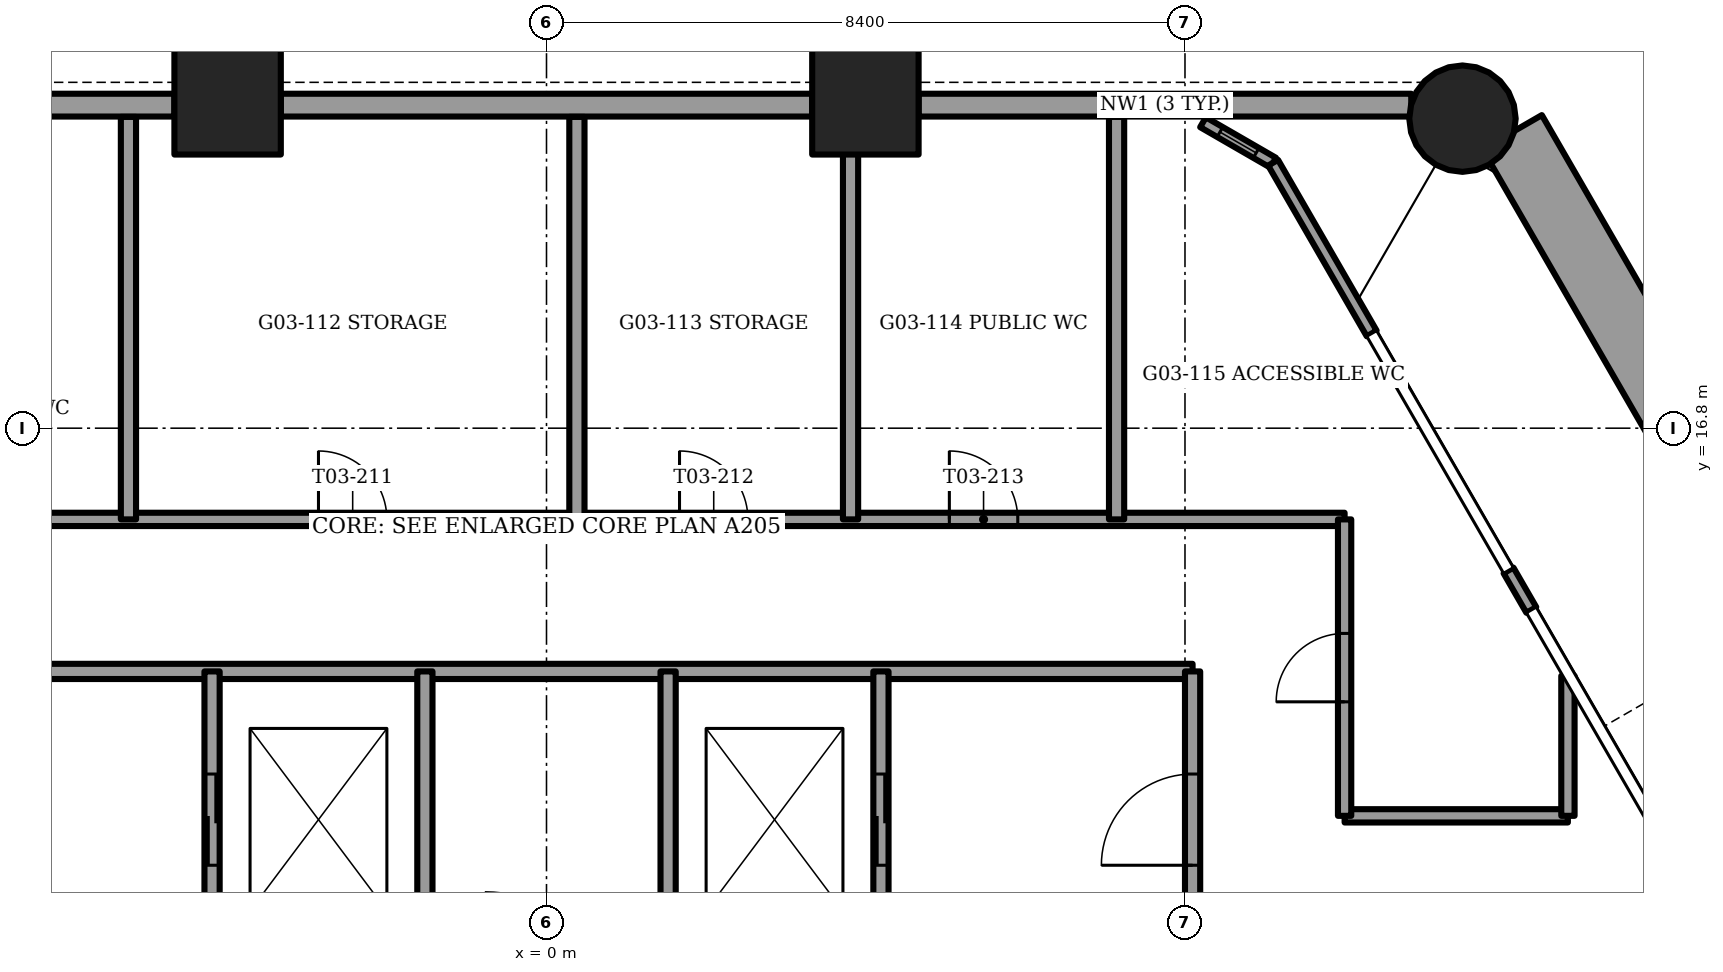
"""IFC4 building model, lengths in metres.
Left out: names, types, materials, properties, quantities, classifications, styles, units other than length and angle.
Written with IfcOpenShell. Run it as: python <this file> out.ifc"""

import sys

from ifc_helpers import new_model, si_unit, direction, frame, frame_2d, origin, origin_2d, place, context, subcontext, project, spatial, rectangle, circle, extrude, element, fill, save


model = new_model("IFC4")
c1 = context("Model", 3, precision=1e-05, world=origin(), true_north=direction((0.0, 1.0)))
c2 = subcontext(c1, "Body", "Model", "MODEL_VIEW")
j1 = project(units=[si_unit("LENGTHUNIT", "METRE"), si_unit("PLANEANGLEUNIT", "RADIAN")], contexts=[c1])
p1 = place(None, origin())
s1 = spatial("IfcSite", under=j1, at=p1, CompositionType="ELEMENT")
p2 = place(p1, origin())
s2 = spatial("IfcBuilding", under=s1, at=p2, CompositionType="ELEMENT")
p3 = place(p2, frame((0.0, 0.0, 14.5)))
s3 = spatial("IfcBuildingStorey", under=s2, at=p3, CompositionType="ELEMENT", Elevation=14.5)
p4 = place(p3, frame((12.051, 20.872, -1.2), z_axis=(0.0, 0.0, 1.0), x_axis=(1.0, 0.0, 0.0)))
e1 = element("IfcColumn", 1, at=p4, inside=s3, PredefinedType="COLUMN", context=c2, shape_type="SweptSolid", body=[
    extrude(circle(Radius=0.7, at=origin_2d()), origin(), (0.0, 0.0, 1.0), 4.5),
])
for number, where, z_axis, x_axis in (
    (2, (4.195, 21.1, -1.2), (0.0, 0.0, 1.0), (1.0, 0.0, 0.0)),
    (3, (-4.195, 21.1, -1.2), (0.0, 0.0, 1.0), (1.0, 0.0, 0.0)),
):
    element("IfcColumn", number, at=place(p3, frame(where, z_axis=z_axis, x_axis=x_axis)), inside=s3, PredefinedType="COLUMN", context=c2, shape_type="SweptSolid", body=[
        extrude(rectangle(XDim=1.4, YDim=1.4, at=origin_2d()), origin(), (0.0, 0.0, 1.0), 4.5),
    ])
p5 = place(p3, frame((16.057, 14.889, 0.0), z_axis=(0.0, 0.0, 1.0), x_axis=(-0.500005133765, 0.866022439784, 0.0)))
e4 = element("IfcWall", 4, at=p5, inside=s3, PredefinedType="PARAPET", context=c2, shape_type="SweptSolid", body=[
    extrude(rectangle(XDim=6.704, YDim=0.9, at=frame_2d((3.352, 0.0))), origin(), (0.0, 0.0, 1.0), 1.1),
])
p6 = place(p3, frame((11.377, 21.05, 0.0), z_axis=(0.0, 0.0, 1.0), x_axis=(-1.0, 0.0, 0.0)))
e5 = element("IfcWall", 5, at=p6, inside=s3, PredefinedType="SOLIDWALL", context=c2, shape_type="SweptSolid", body=[
    extrude(rectangle(XDim=6.481, YDim=0.3, at=frame_2d((3.241, 0.0))), origin(), (0.0, 0.0, 1.0), 3.3),
])
p7 = place(p3, frame((3.495, 21.05, 0.0), z_axis=(0.0, 0.0, 1.0), x_axis=(-1.0, 0.0, 0.0)))
e6 = element("IfcWall", 6, at=p7, inside=s3, PredefinedType="SOLIDWALL", context=c2, shape_type="SweptSolid", body=[
    extrude(rectangle(XDim=6.991, YDim=0.3, at=frame_2d((3.495, 0.0))), origin(), (0.0, 0.0, 1.0), 3.3),
])
p8 = place(p3, frame((-4.896, 21.05, 0.0), z_axis=(0.0, 0.0, 1.0), x_axis=(-1.0, 0.0, 0.0)))
e7 = element("IfcWall", 7, at=p8, inside=s3, PredefinedType="SOLIDWALL", context=c2, shape_type="SweptSolid", body=[
    extrude(rectangle(XDim=6.481, YDim=0.3, at=frame_2d((3.241, 0.0))), origin(), (0.0, 0.0, 1.0), 3.3),
])
p9 = place(p3, frame((10.856, 18.046, 0.0), z_axis=(0.0, 0.0, 1.0), x_axis=(-0.499945140294, 0.866057074734, 0.0)))
e8 = element("IfcWall", 8, at=p9, inside=s3, PredefinedType="SOLIDWALL", context=c2, shape_type="SweptSolid", body=[
    extrude(rectangle(XDim=2.594, YDim=0.15, at=frame_2d((1.297, 0.0))), origin(), (0.0, 0.0, 1.0), 4.2),
])
p10 = place(p3, frame((12.957, 14.409, 0.0), z_axis=(0.0, 0.0, 1.0), x_axis=(-0.50012165622, 0.865955154139, 0.0)))
e9 = element("IfcWall", 9, at=p10, inside=s3, PredefinedType="SOLIDWALL", context=c2, shape_type="SweptSolid", body=[
    extrude(rectangle(XDim=0.6, YDim=0.15, at=frame_2d((0.3, 0.0))), origin(), (0.0, 0.0, 1.0), 4.2),
])
p11 = place(p3, frame((9.56, 20.292, 0.0), z_axis=(0.0, 0.0, 1.0), x_axis=(-0.866048165231, 0.499960573946, 0.0)))
e10 = element("IfcWall", 10, at=p11, inside=s3, PredefinedType="SOLIDWALL", context=c2, shape_type="SweptSolid", body=[
    extrude(rectangle(XDim=1.065, YDim=0.15, at=frame_2d((0.532, 0.0))), origin(), (0.0, 0.0, 1.0), 4.2),
])
p12 = place(p11, frame((0.258, 0.0, 0.15)))
e11 = element("IfcOpeningElement", 11, at=p12, cuts=e10, PredefinedType="OPENING", context=c2, shape_type="SweptSolid", body=[
    extrude(rectangle(XDim=0.55, YDim=3.6, at=frame_2d((0.275, 1.8))), frame((0.0, 0.075, 0.0), z_axis=(0.0, -1.0, 0.0), x_axis=(1.0, 0.0, 0.0)), (0.0, 0.0, 1.0), 0.15),
])
p13 = place(p3, frame((-8.5, 13.6, 0.0), z_axis=(0.0, 0.0, 1.0), x_axis=(1.0, 0.0, 0.0)))
e12 = element("IfcWall", 12, at=p13, inside=s3, PredefinedType="PARTITIONING", context=c2, shape_type="SweptSolid", body=[
    extrude(rectangle(XDim=17.0, YDim=0.2, at=frame_2d((8.5, 0.0))), origin(), (0.0, 0.0, 1.0), 4.2),
])
p14 = place(p3, frame((8.5, 9.7, 0.0), z_axis=(0.0, 0.0, 1.0), x_axis=(0.0, 1.0, 0.0)))
e13 = element("IfcWall", 13, at=p14, inside=s3, PredefinedType="PARTITIONING", context=c2, shape_type="SweptSolid", body=[
    extrude(rectangle(XDim=3.9, YDim=0.2, at=frame_2d((1.95, 0.0))), origin(), (0.0, 0.0, 1.0), 4.2),
])
p15 = place(p14, frame((1.35, 0.0, 0.0)))
e14 = element("IfcOpeningElement", 14, at=p15, cuts=e13, PredefinedType="OPENING", context=c2, shape_type="SweptSolid", body=[
    extrude(rectangle(XDim=1.2, YDim=2.1, at=frame_2d((0.6, 1.05))), frame((0.0, 0.1, 0.0), z_axis=(0.0, -1.0, 0.0), x_axis=(1.0, 0.0, 0.0)), (0.0, 0.0, 1.0), 0.2),
])
p16 = place(p3, frame((-4.4, 9.7, 0.0), z_axis=(0.0, 0.0, 1.0), x_axis=(0.0, 1.0, 0.0)))
e15 = element("IfcWall", 15, at=p16, inside=s3, PredefinedType="PARTITIONING", context=c2, shape_type="SweptSolid", body=[
    extrude(rectangle(XDim=3.9, YDim=0.2, at=frame_2d((1.95, 0.0))), origin(), (0.0, 0.0, 1.0), 4.2),
])
p17 = place(p16, frame((1.35, 0.0, 0.0)))
e16 = element("IfcOpeningElement", 16, at=p17, cuts=e15, PredefinedType="OPENING", context=c2, shape_type="SweptSolid", body=[
    extrude(rectangle(XDim=1.2, YDim=2.1, at=frame_2d((0.6, 1.05))), frame((0.0, 0.1, 0.0), z_axis=(0.0, -1.0, 0.0), x_axis=(1.0, 0.0, 0.0)), (0.0, 0.0, 1.0), 0.2),
])
p18 = place(p3, frame((4.4, 9.7, 0.0), z_axis=(0.0, 0.0, 1.0), x_axis=(0.0, 1.0, 0.0)))
e17 = element("IfcWall", 17, at=p18, inside=s3, PredefinedType="PARTITIONING", context=c2, shape_type="SweptSolid", body=[
    extrude(rectangle(XDim=3.9, YDim=0.2, at=frame_2d((1.95, 0.0))), origin(), (0.0, 0.0, 1.0), 4.2),
])
p19 = place(p18, frame((1.35, 0.0, 0.0)))
e18 = element("IfcOpeningElement", 18, at=p19, cuts=e17, PredefinedType="OPENING", context=c2, shape_type="SweptSolid", body=[
    extrude(rectangle(XDim=1.2, YDim=2.1, at=frame_2d((0.6, 1.05))), frame((0.0, 0.1, 0.0), z_axis=(0.0, -1.0, 0.0), x_axis=(1.0, 0.0, 0.0)), (0.0, 0.0, 1.0), 0.2),
])
for number, where, z_axis, x_axis in (
    (19, (-1.6, 9.7, 0.0), (0.0, 0.0, 1.0), (0.0, 1.0, 0.0)),
    (20, (1.6, 9.7, 0.0), (0.0, 0.0, 1.0), (0.0, 1.0, 0.0)),
):
    element("IfcWall", number, at=place(p3, frame(where, z_axis=z_axis, x_axis=x_axis)), inside=s3, PredefinedType="PARTITIONING", context=c2, shape_type="SweptSolid", body=[
        extrude(rectangle(XDim=3.9, YDim=0.2, at=frame_2d((1.95, 0.0))), origin(), (0.0, 0.0, 1.0), 4.2),
    ])
p20 = place(p3, frame((10.5, 11.7, 0.0), z_axis=(0.0, 0.0, 1.0), x_axis=(1.0, 0.0, 0.0)))
e21 = element("IfcWall", 21, at=p20, inside=s3, PredefinedType="PARTITIONING", context=c2, shape_type="SweptSolid", body=[
    extrude(rectangle(XDim=2.938, YDim=0.175, at=frame_2d((1.469, 0.0))), origin(), (0.0, 0.0, 1.0), 4.2),
])
p21 = place(p3, frame((-10.5, 15.6, 0.0), z_axis=(0.0, 0.0, 1.0), x_axis=(1.0, 0.0, 0.0)))
e22 = element("IfcWall", 22, at=p21, inside=s3, PredefinedType="PARTITIONING", context=c2, shape_type="SweptSolid", body=[
    extrude(rectangle(XDim=21.0, YDim=0.175, at=frame_2d((10.5, 0.0))), origin(), (0.0, 0.0, 1.0), 4.2),
])
p22 = place(p21, frame((2.3, 0.0, 0.0)))
e23 = element("IfcOpeningElement", 23, at=p22, cuts=e22, PredefinedType="OPENING", context=c2, shape_type="SweptSolid", body=[
    extrude(rectangle(XDim=0.9, YDim=2.1, at=frame_2d((0.45, 1.05))), frame((0.0, 0.087, 0.0), z_axis=(0.0, -1.0, 0.0), x_axis=(1.0, 0.0, 0.0)), (0.0, 0.0, 1.0), 0.175),
])
p23 = place(p21, frame((7.5, 0.0, 0.0)))
e24 = element("IfcOpeningElement", 24, at=p23, cuts=e22, PredefinedType="OPENING", context=c2, shape_type="SweptSolid", body=[
    extrude(rectangle(XDim=0.9, YDim=2.1, at=frame_2d((0.45, 1.05))), frame((0.0, 0.087, 0.0), z_axis=(0.0, -1.0, 0.0), x_axis=(1.0, 0.0, 0.0)), (0.0, 0.0, 1.0), 0.175),
])
p24 = place(p21, frame((12.25, 0.0, 0.0)))
e25 = element("IfcOpeningElement", 25, at=p24, cuts=e22, PredefinedType="OPENING", context=c2, shape_type="SweptSolid", body=[
    extrude(rectangle(XDim=0.9, YDim=2.1, at=frame_2d((0.45, 1.05))), frame((0.0, 0.087, 0.0), z_axis=(0.0, -1.0, 0.0), x_axis=(1.0, 0.0, 0.0)), (0.0, 0.0, 1.0), 0.175),
])
p25 = place(p21, frame((15.8, 0.0, 0.0)))
e26 = element("IfcOpeningElement", 26, at=p25, cuts=e22, PredefinedType="OPENING", context=c2, shape_type="SweptSolid", body=[
    extrude(rectangle(XDim=0.9, YDim=2.1, at=frame_2d((0.45, 1.05))), frame((0.0, 0.087, 0.0), z_axis=(0.0, -1.0, 0.0), x_axis=(1.0, 0.0, 0.0)), (0.0, 0.0, 1.0), 0.175),
])
p26 = place(p3, frame((10.5, 11.7, 0.0), z_axis=(0.0, 0.0, 1.0), x_axis=(0.0, 1.0, 0.0)))
e27 = element("IfcWall", 27, at=p26, inside=s3, PredefinedType="PARTITIONING", context=c2, shape_type="SweptSolid", body=[
    extrude(rectangle(XDim=3.9, YDim=0.175, at=frame_2d((1.95, 0.0))), origin(), (0.0, 0.0, 1.0), 4.2),
])
p27 = place(p26, frame((1.5, 0.0, 0.0)))
e28 = element("IfcOpeningElement", 28, at=p27, cuts=e27, PredefinedType="OPENING", context=c2, shape_type="SweptSolid", body=[
    extrude(rectangle(XDim=0.9, YDim=2.1, at=frame_2d((0.45, 1.05))), frame((0.0, 0.087, 0.0), z_axis=(0.0, -1.0, 0.0), x_axis=(1.0, 0.0, 0.0)), (0.0, 0.0, 1.0), 0.175),
])
p28 = place(p3, frame((13.438, 11.7, 0.0), z_axis=(0.0, 0.0, 1.0), x_axis=(0.0, 1.0, 0.0)))
e29 = element("IfcWall", 29, at=p28, inside=s3, PredefinedType="PARTITIONING", context=c2, shape_type="SweptSolid", body=[
    extrude(rectangle(XDim=1.842, YDim=0.175, at=frame_2d((0.921, 0.0))), origin(), (0.0, 0.0, 1.0), 4.2),
])
for number, where, z_axis, x_axis in (
    (30, (-5.5, 15.6, 0.0), (0.0, 0.0, 1.0), (0.0, 1.0, 0.0)),
    (31, (0.4, 15.6, 0.0), (0.0, 0.0, 1.0), (0.0, 1.0, 0.0)),
):
    element("IfcWall", number, at=place(p3, frame(where, z_axis=z_axis, x_axis=x_axis)), inside=s3, PredefinedType="PARTITIONING", context=c2, shape_type="SweptSolid", body=[
        extrude(rectangle(XDim=5.295, YDim=0.2, at=frame_2d((2.647, 0.0))), origin(), (0.0, 0.0, 1.0), 4.2),
    ])
p29 = place(p3, frame((4.0, 15.6, 0.0), z_axis=(0.0, 0.0, 1.0), x_axis=(0.0, 1.0, 0.0)))
e32 = element("IfcWall", 32, at=p29, inside=s3, PredefinedType="PARTITIONING", context=c2, shape_type="SweptSolid", body=[
    extrude(rectangle(XDim=5.07, YDim=0.2, at=frame_2d((2.535, 0.0))), origin(), (0.0, 0.0, 1.0), 4.2),
])
p30 = place(p3, frame((7.5, 15.6, 0.0), z_axis=(0.0, 0.0, 1.0), x_axis=(0.0, 1.0, 0.0)))
e33 = element("IfcWall", 33, at=p30, inside=s3, PredefinedType="PARTITIONING", context=c2, shape_type="SweptSolid", body=[
    extrude(rectangle(XDim=5.295, YDim=0.2, at=frame_2d((2.647, 0.0))), origin(), (0.0, 0.0, 1.0), 4.2),
])
p31 = place(p12, origin())
e34 = element("IfcWindow", 34, at=p31, inside=s3, PartitioningType="SINGLE_PANEL", PredefinedType="WINDOW", context=c2, shape_type="SweptSolid", body=[
    extrude(rectangle(XDim=0.55, YDim=3.6, at=frame_2d((0.275, 1.8))), frame((0.0, 0.03, 0.0), z_axis=(0.0, -1.0, 0.0), x_axis=(1.0, 0.0, 0.0)), (0.0, 0.0, 1.0), 0.06),
])
fill(e11, e34)
p32 = place(p17, origin())
e35 = element("IfcDoor", 35, at=p32, inside=s3, OperationType="SLIDING_TO_LEFT", PredefinedType="DOOR", context=c2, shape_type="SweptSolid", body=[
    extrude(rectangle(XDim=1.2, YDim=2.1, at=frame_2d((0.6, 1.05))), frame((0.0, 0.025, 0.0), z_axis=(0.0, -1.0, 0.0), x_axis=(1.0, 0.0, 0.0)), (0.0, 0.0, 1.0), 0.05),
])
fill(e16, e35)
p33 = place(p19, origin())
e36 = element("IfcDoor", 36, at=p33, inside=s3, OperationType="SLIDING_TO_LEFT", PredefinedType="DOOR", context=c2, shape_type="SweptSolid", body=[
    extrude(rectangle(XDim=1.2, YDim=2.1, at=frame_2d((0.6, 1.05))), frame((0.0, 0.025, 0.0), z_axis=(0.0, -1.0, 0.0), x_axis=(1.0, 0.0, 0.0)), (0.0, 0.0, 1.0), 0.05),
])
fill(e18, e36)
p34 = place(p15, origin())
e37 = element("IfcDoor", 37, at=p34, inside=s3, OperationType="SINGLE_SWING_LEFT", PredefinedType="DOOR", context=c2, shape_type="SweptSolid", body=[
    extrude(rectangle(XDim=1.2, YDim=2.1, at=frame_2d((0.6, 1.05))), frame((0.0, 0.025, 0.0), z_axis=(0.0, -1.0, 0.0), x_axis=(1.0, 0.0, 0.0)), (0.0, 0.0, 1.0), 0.05),
])
fill(e14, e37)
p35 = place(p23, origin())
e38 = element("IfcDoor", 38, at=p35, inside=s3, OperationType="SINGLE_SWING_LEFT", PredefinedType="DOOR", context=c2, shape_type="SweptSolid", body=[
    extrude(rectangle(XDim=0.9, YDim=2.1, at=frame_2d((0.45, 1.05))), frame((0.0, 0.025, 0.0), z_axis=(0.0, -1.0, 0.0), x_axis=(1.0, 0.0, 0.0)), (0.0, 0.0, 1.0), 0.05),
])
fill(e24, e38)
p36 = place(p24, origin())
e39 = element("IfcDoor", 39, at=p36, inside=s3, OperationType="SINGLE_SWING_RIGHT", PredefinedType="DOOR", context=c2, shape_type="SweptSolid", body=[
    extrude(rectangle(XDim=0.9, YDim=2.1, at=frame_2d((0.45, 1.05))), frame((0.0, 0.025, 0.0), z_axis=(0.0, -1.0, 0.0), x_axis=(1.0, 0.0, 0.0)), (0.0, 0.0, 1.0), 0.05),
])
fill(e25, e39)
p37 = place(p25, origin())
e40 = element("IfcDoor", 40, at=p37, inside=s3, OperationType="SINGLE_SWING_LEFT", PredefinedType="DOOR", context=c2, shape_type="SweptSolid", body=[
    extrude(rectangle(XDim=0.9, YDim=2.1, at=frame_2d((0.45, 1.05))), frame((0.0, 0.025, 0.0), z_axis=(0.0, -1.0, 0.0), x_axis=(1.0, 0.0, 0.0)), (0.0, 0.0, 1.0), 0.05),
])
fill(e26, e40)
p38 = place(p27, origin())
e41 = element("IfcDoor", 41, at=p38, inside=s3, OperationType="SINGLE_SWING_RIGHT", PredefinedType="DOOR", context=c2, shape_type="SweptSolid", body=[
    extrude(rectangle(XDim=0.9, YDim=2.1, at=frame_2d((0.45, 1.05))), frame((0.0, 0.025, 0.0), z_axis=(0.0, -1.0, 0.0), x_axis=(1.0, 0.0, 0.0)), (0.0, 0.0, 1.0), 0.05),
])
fill(e28, e41)
save(model, sys.argv[1])
